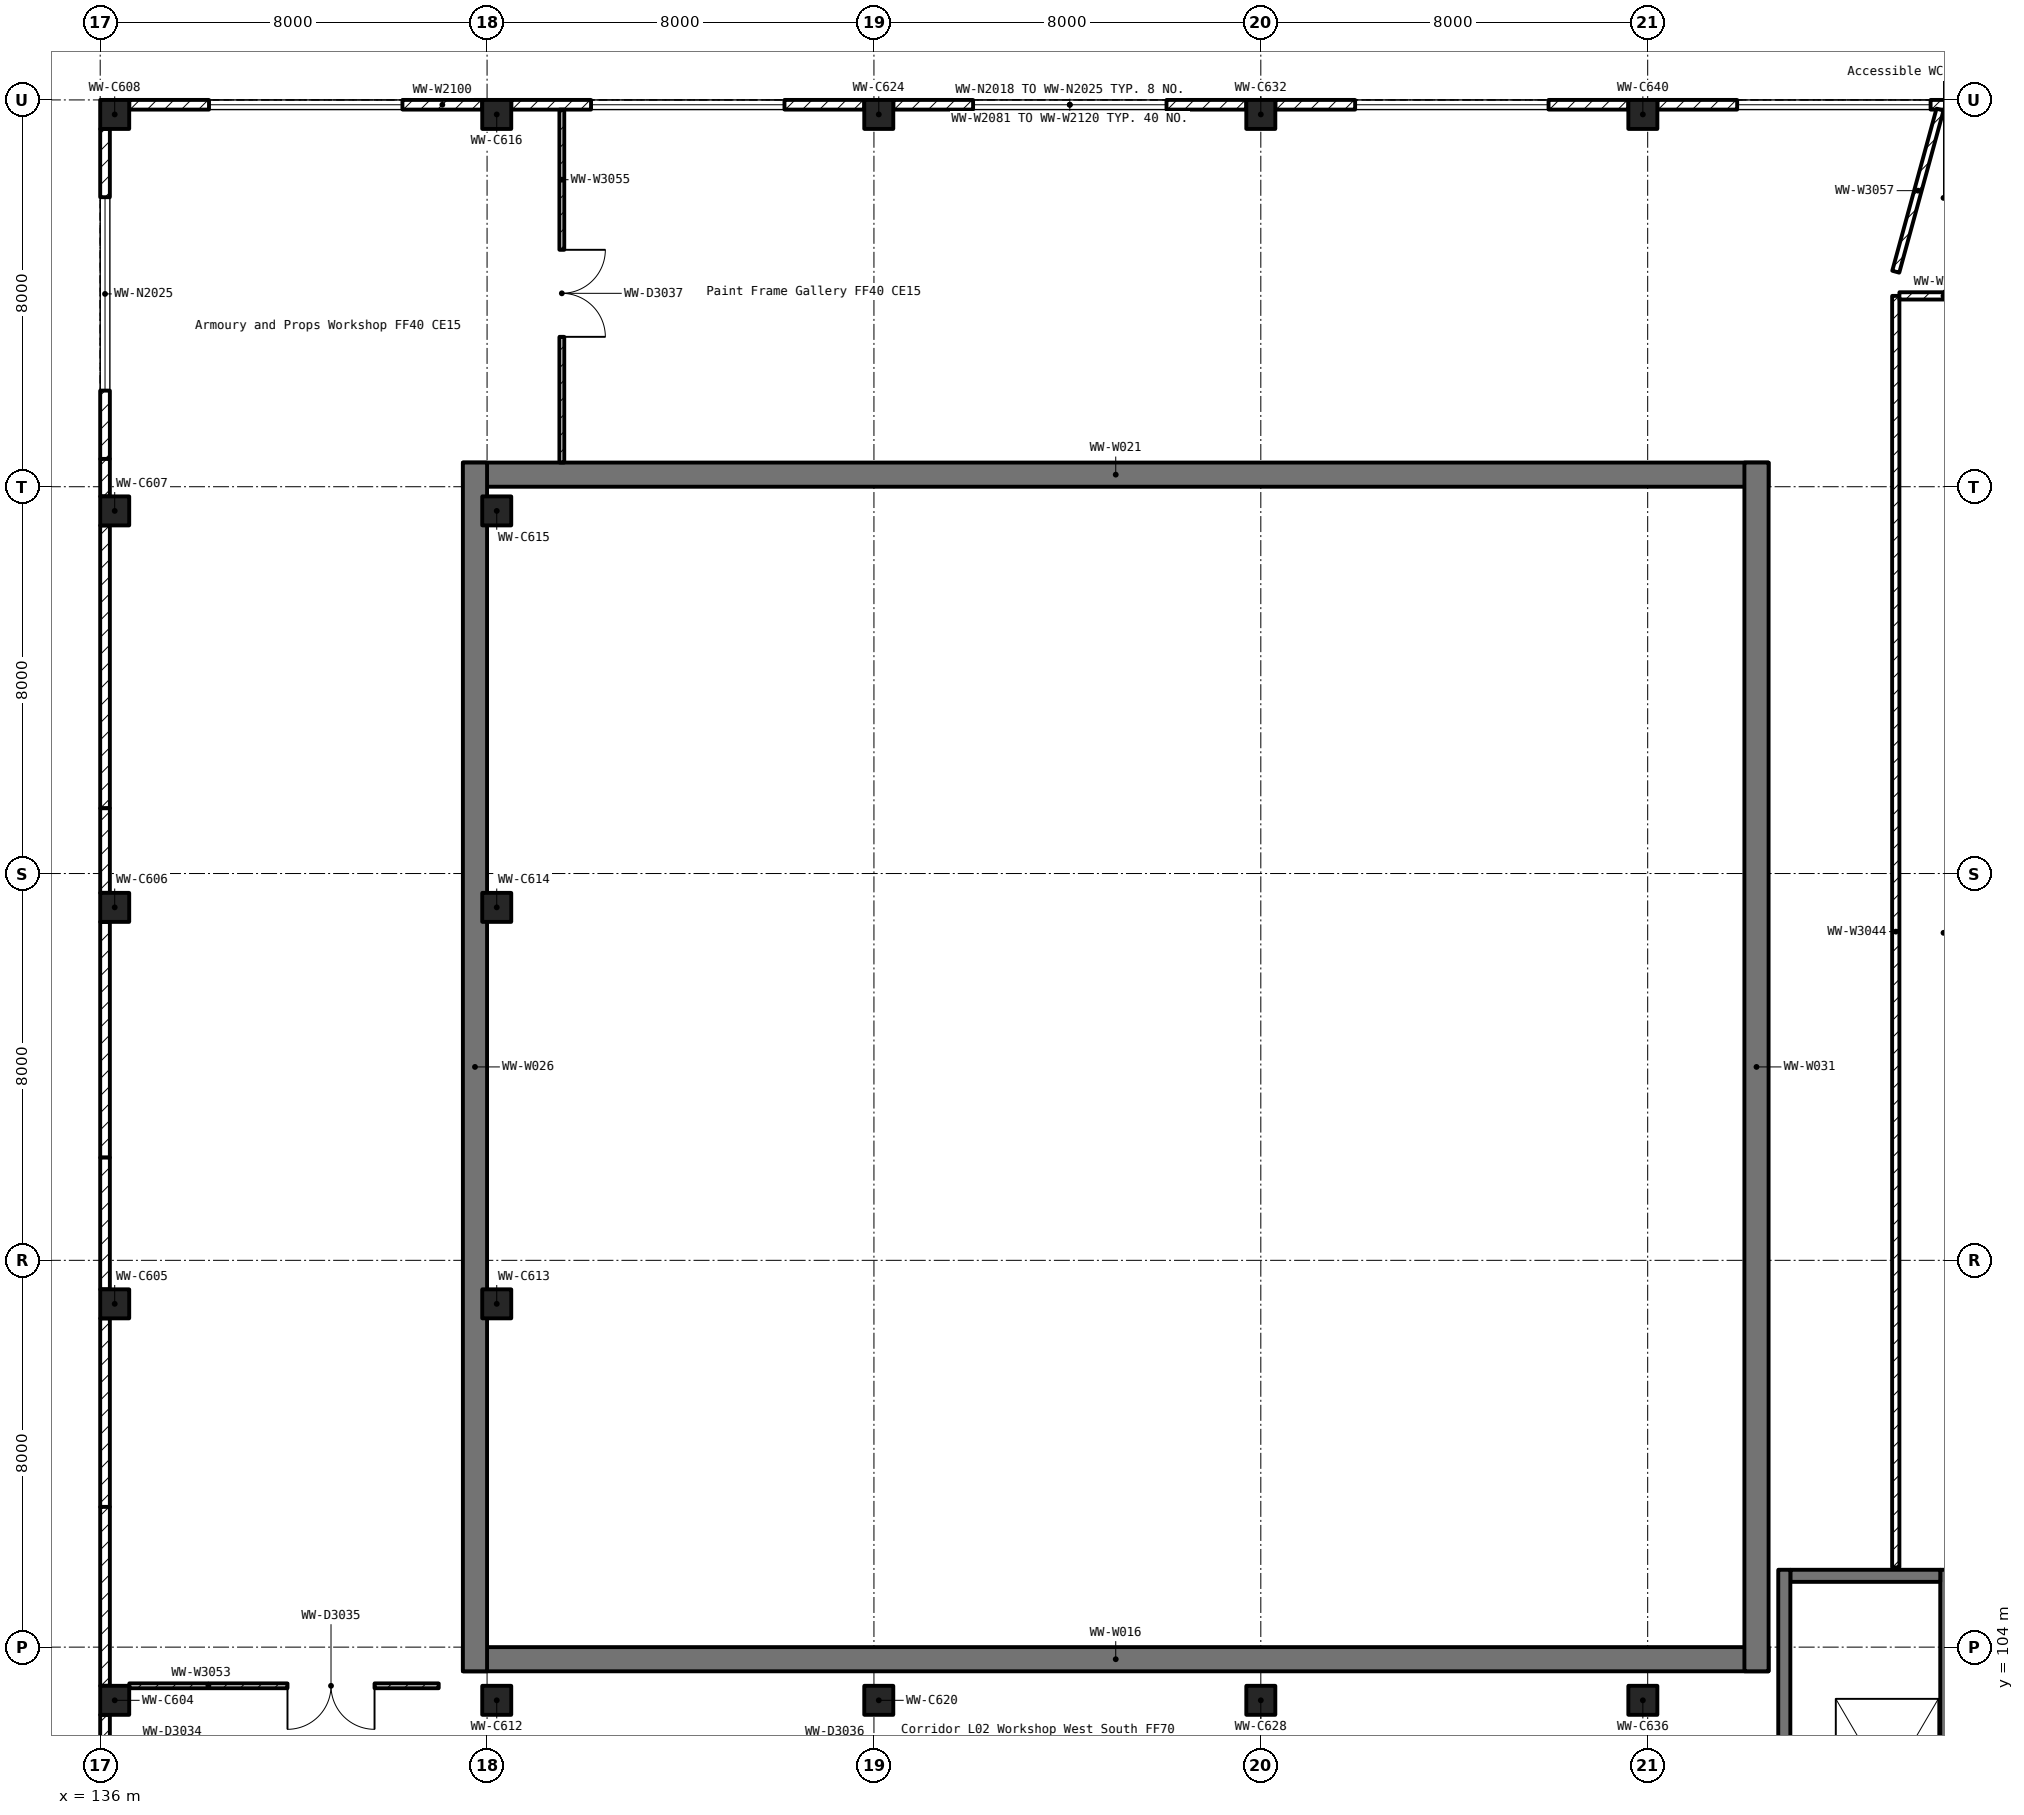
"""IFC4 building model, lengths in metres.
Left out: names, types, materials, properties, quantities, classifications, styles, units other than length and angle.
Written with IfcOpenShell. Run it as: python <this file> out.ifc"""

import sys

from ifc_helpers import new_model, si_unit, direction, frame, frame_2d, origin, origin_2d, place, context, subcontext, project, spatial, rectangle, extrude, element, fill, save


model = new_model("IFC4")
c1 = context("Model", 3, precision=1e-05, world=origin(), true_north=direction((0.0, 1.0)))
c2 = subcontext(c1, "Body", "Model", "MODEL_VIEW")
j1 = project(units=[si_unit("LENGTHUNIT", "METRE"), si_unit("PLANEANGLEUNIT", "RADIAN")], contexts=[c1])
p1 = place(None, origin())
s1 = spatial("IfcSite", under=j1, at=p1, CompositionType="ELEMENT")
p2 = place(p1, origin())
s2 = spatial("IfcBuilding", under=s1, at=p2, CompositionType="ELEMENT")
p3 = place(p2, frame((0.0, 0.0, 11.5)))
s3 = spatial("IfcBuildingStorey", under=s2, at=p3, CompositionType="ELEMENT", Elevation=11.5)
for number, where, z_axis, x_axis in (
    (1, (136.3, 102.9, 0.0), (0.0, 0.0, 1.0), (1.0, 0.0, 0.0)),
    (2, (136.3, 111.1, 0.0), (0.0, 0.0, 1.0), (1.0, 0.0, 0.0)),
    (3, (136.3, 119.3, 0.0), (0.0, 0.0, 1.0), (1.0, 0.0, 0.0)),
    (4, (136.3, 127.5, 0.0), (0.0, 0.0, 1.0), (1.0, 0.0, 0.0)),
    (5, (136.3, 135.7, 0.0), (0.0, 0.0, 1.0), (1.0, 0.0, 0.0)),
    (6, (144.2, 102.9, 0.0), (0.0, 0.0, 1.0), (1.0, 0.0, 0.0)),
    (7, (144.2, 111.1, 0.0), (0.0, 0.0, 1.0), (1.0, 0.0, 0.0)),
    (8, (144.2, 119.3, 0.0), (0.0, 0.0, 1.0), (1.0, 0.0, 0.0)),
    (9, (144.2, 127.5, 0.0), (0.0, 0.0, 1.0), (1.0, 0.0, 0.0)),
    (10, (144.2, 135.7, 0.0), (0.0, 0.0, 1.0), (1.0, 0.0, 0.0)),
    (11, (152.1, 102.9, 0.0), (0.0, 0.0, 1.0), (1.0, 0.0, 0.0)),
    (12, (152.1, 135.7, 0.0), (0.0, 0.0, 1.0), (1.0, 0.0, 0.0)),
    (13, (160.0, 102.9, 0.0), (0.0, 0.0, 1.0), (1.0, 0.0, 0.0)),
    (14, (160.0, 135.7, 0.0), (0.0, 0.0, 1.0), (1.0, 0.0, 0.0)),
    (15, (167.9, 102.9, 0.0), (0.0, 0.0, 1.0), (1.0, 0.0, 0.0)),
    (16, (167.9, 135.7, 0.0), (0.0, 0.0, 1.0), (1.0, 0.0, 0.0)),
):
    element("IfcColumn", number, at=place(p3, frame(where, z_axis=z_axis, x_axis=x_axis)), inside=s3, PredefinedType="COLUMN", context=c2, shape_type="SweptSolid", body=[
        extrude(rectangle(XDim=0.6, YDim=0.6, at=origin_2d()), origin(), (0.0, 0.0, 1.0), 5.5),
    ])
for number, where, z_axis, x_axis in (
    (17, (143.5, 103.75, 0.0), (0.0, 0.0, 1.0), (1.0, 0.0, 0.0)),
    (18, (143.5, 128.25, 0.0), (0.0, 0.0, 1.0), (1.0, 0.0, 0.0)),
):
    element("IfcWall", number, at=place(p3, frame(where, z_axis=z_axis, x_axis=x_axis)), inside=s3, PredefinedType="SHEAR", context=c2, shape_type="SweptSolid", body=[
        extrude(rectangle(XDim=27.0, YDim=0.5, at=frame_2d((13.5, 0.0))), origin(), (0.0, 0.0, 1.0), 5.5),
    ])
for number, where, z_axis, x_axis in (
    (19, (143.75, 103.5, 0.0), (0.0, 0.0, 1.0), (0.0, 1.0, 0.0)),
    (20, (170.25, 103.5, 0.0), (0.0, 0.0, 1.0), (0.0, 1.0, 0.0)),
):
    element("IfcWall", number, at=place(p3, frame(where, z_axis=z_axis, x_axis=x_axis)), inside=s3, PredefinedType="SHEAR", context=c2, shape_type="SweptSolid", body=[
        extrude(rectangle(XDim=25.0, YDim=0.5, at=frame_2d((12.5, 0.0))), origin(), (0.0, 0.0, 1.0), 5.5),
    ])
p4 = place(p3, frame((175.5, 135.9, 0.0), z_axis=(0.0, 0.0, 1.0), x_axis=(-1.0, 0.0, 0.0)))
e21 = element("IfcWall", 21, at=p4, inside=s3, PredefinedType="SOLIDWALL", context=c2, shape_type="SweptSolid", body=[
    extrude(rectangle(XDim=7.3, YDim=0.2, at=frame_2d((3.65, 0.0))), origin(), (0.0, 0.0, 1.0), 4.45),
])
p5 = place(p4, frame((1.65, 0.0, 1.0)))
e22 = element("IfcOpeningElement", 22, at=p5, cuts=e21, PredefinedType="OPENING", context=c2, shape_type="SweptSolid", body=[
    extrude(rectangle(XDim=4.0, YDim=1.8, at=frame_2d((2.0, 0.9))), frame((0.0, 0.112, 0.0), z_axis=(0.0, -1.0, 0.0), x_axis=(1.0, 0.0, 0.0)), (0.0, 0.0, 1.0), 0.224),
])
p6 = place(p3, frame((167.6, 135.9, 0.0), z_axis=(0.0, 0.0, 1.0), x_axis=(-1.0, 0.0, 0.0)))
e23 = element("IfcWall", 23, at=p6, inside=s3, PredefinedType="SOLIDWALL", context=c2, shape_type="SweptSolid", body=[
    extrude(rectangle(XDim=7.3, YDim=0.2, at=frame_2d((3.65, 0.0))), origin(), (0.0, 0.0, 1.0), 4.45),
])
p7 = place(p6, frame((1.65, 0.0, 1.0)))
e24 = element("IfcOpeningElement", 24, at=p7, cuts=e23, PredefinedType="OPENING", context=c2, shape_type="SweptSolid", body=[
    extrude(rectangle(XDim=4.0, YDim=1.8, at=frame_2d((2.0, 0.9))), frame((0.0, 0.112, 0.0), z_axis=(0.0, -1.0, 0.0), x_axis=(1.0, 0.0, 0.0)), (0.0, 0.0, 1.0), 0.224),
])
p8 = place(p3, frame((159.7, 135.9, 0.0), z_axis=(0.0, 0.0, 1.0), x_axis=(-1.0, 0.0, 0.0)))
e25 = element("IfcWall", 25, at=p8, inside=s3, PredefinedType="SOLIDWALL", context=c2, shape_type="SweptSolid", body=[
    extrude(rectangle(XDim=7.3, YDim=0.2, at=frame_2d((3.65, 0.0))), origin(), (0.0, 0.0, 1.0), 4.45),
])
p9 = place(p8, frame((1.65, 0.0, 1.0)))
e26 = element("IfcOpeningElement", 26, at=p9, cuts=e25, PredefinedType="OPENING", context=c2, shape_type="SweptSolid", body=[
    extrude(rectangle(XDim=4.0, YDim=1.8, at=frame_2d((2.0, 0.9))), frame((0.0, 0.112, 0.0), z_axis=(0.0, -1.0, 0.0), x_axis=(1.0, 0.0, 0.0)), (0.0, 0.0, 1.0), 0.224),
])
p10 = place(p3, frame((151.8, 135.9, 0.0), z_axis=(0.0, 0.0, 1.0), x_axis=(-1.0, 0.0, 0.0)))
e27 = element("IfcWall", 27, at=p10, inside=s3, PredefinedType="SOLIDWALL", context=c2, shape_type="SweptSolid", body=[
    extrude(rectangle(XDim=7.3, YDim=0.2, at=frame_2d((3.65, 0.0))), origin(), (0.0, 0.0, 1.0), 4.45),
])
p11 = place(p10, frame((1.65, 0.0, 1.0)))
e28 = element("IfcOpeningElement", 28, at=p11, cuts=e27, PredefinedType="OPENING", context=c2, shape_type="SweptSolid", body=[
    extrude(rectangle(XDim=4.0, YDim=1.8, at=frame_2d((2.0, 0.9))), frame((0.0, 0.112, 0.0), z_axis=(0.0, -1.0, 0.0), x_axis=(1.0, 0.0, 0.0)), (0.0, 0.0, 1.0), 0.224),
])
p12 = place(p3, frame((143.9, 135.9, 0.0), z_axis=(0.0, 0.0, 1.0), x_axis=(-1.0, 0.0, 0.0)))
e29 = element("IfcWall", 29, at=p12, inside=s3, PredefinedType="SOLIDWALL", context=c2, shape_type="SweptSolid", body=[
    extrude(rectangle(XDim=7.3, YDim=0.2, at=frame_2d((3.65, 0.0))), origin(), (0.0, 0.0, 1.0), 4.45),
])
p13 = place(p12, frame((1.65, 0.0, 1.0)))
e30 = element("IfcOpeningElement", 30, at=p13, cuts=e29, PredefinedType="OPENING", context=c2, shape_type="SweptSolid", body=[
    extrude(rectangle(XDim=4.0, YDim=1.8, at=frame_2d((2.0, 0.9))), frame((0.0, 0.112, 0.0), z_axis=(0.0, -1.0, 0.0), x_axis=(1.0, 0.0, 0.0)), (0.0, 0.0, 1.0), 0.224),
])
p14 = place(p3, frame((136.1, 135.4, 0.0), z_axis=(0.0, 0.0, 1.0), x_axis=(0.0, -1.0, 0.0)))
e31 = element("IfcWall", 31, at=p14, inside=s3, PredefinedType="SOLIDWALL", context=c2, shape_type="SweptSolid", body=[
    extrude(rectangle(XDim=6.825, YDim=0.2, at=frame_2d((3.413, 0.0))), origin(), (0.0, 0.0, 1.0), 4.45),
])
p15 = place(p14, frame((1.412, 0.0, 1.0)))
e32 = element("IfcOpeningElement", 32, at=p15, cuts=e31, PredefinedType="OPENING", context=c2, shape_type="SweptSolid", body=[
    extrude(rectangle(XDim=4.0, YDim=1.8, at=frame_2d((2.0, 0.9))), frame((0.0, 0.112, 0.0), z_axis=(0.0, -1.0, 0.0), x_axis=(1.0, 0.0, 0.0)), (0.0, 0.0, 1.0), 0.224),
])
p16 = place(p3, frame((136.1, 128.575, 0.0), z_axis=(0.0, 0.0, 1.0), x_axis=(0.0, -1.0, 0.0)))
e33 = element("IfcWall", 33, at=p16, inside=s3, PredefinedType="SOLIDWALL", context=c2, shape_type="SweptSolid", body=[
    extrude(rectangle(XDim=0.775, YDim=0.2, at=frame_2d((0.387, 0.0))), origin(), (0.0, 0.0, 1.0), 4.45),
])
p17 = place(p3, frame((136.1, 127.2, 0.0), z_axis=(0.0, 0.0, 1.0), x_axis=(0.0, -1.0, 0.0)))
e34 = element("IfcWall", 34, at=p17, inside=s3, PredefinedType="SOLIDWALL", context=c2, shape_type="SweptSolid", body=[
    extrude(rectangle(XDim=5.85, YDim=0.2, at=frame_2d((2.925, 0.0))), origin(), (0.0, 0.0, 1.0), 4.45),
])
p18 = place(p3, frame((136.1, 121.35, 0.0), z_axis=(0.0, 0.0, 1.0), x_axis=(0.0, -1.0, 0.0)))
e35 = element("IfcWall", 35, at=p18, inside=s3, PredefinedType="SOLIDWALL", context=c2, shape_type="SweptSolid", body=[
    extrude(rectangle(XDim=1.75, YDim=0.2, at=frame_2d((0.875, 0.0))), origin(), (0.0, 0.0, 1.0), 4.45),
])
p19 = place(p3, frame((136.1, 119.0, 0.0), z_axis=(0.0, 0.0, 1.0), x_axis=(0.0, -1.0, 0.0)))
e36 = element("IfcWall", 36, at=p19, inside=s3, PredefinedType="SOLIDWALL", context=c2, shape_type="SweptSolid", body=[
    extrude(rectangle(XDim=4.875, YDim=0.2, at=frame_2d((2.438, 0.0))), origin(), (0.0, 0.0, 1.0), 4.45),
])
p20 = place(p3, frame((136.1, 114.125, 0.0), z_axis=(0.0, 0.0, 1.0), x_axis=(0.0, -1.0, 0.0)))
e37 = element("IfcWall", 37, at=p20, inside=s3, PredefinedType="SOLIDWALL", context=c2, shape_type="SweptSolid", body=[
    extrude(rectangle(XDim=2.725, YDim=0.2, at=frame_2d((1.363, 0.0))), origin(), (0.0, 0.0, 1.0), 4.45),
])
p21 = place(p3, frame((136.1, 110.8, 0.0), z_axis=(0.0, 0.0, 1.0), x_axis=(0.0, -1.0, 0.0)))
e38 = element("IfcWall", 38, at=p21, inside=s3, PredefinedType="SOLIDWALL", context=c2, shape_type="SweptSolid", body=[
    extrude(rectangle(XDim=3.9, YDim=0.2, at=frame_2d((1.95, 0.0))), origin(), (0.0, 0.0, 1.0), 4.45),
])
p22 = place(p3, frame((136.1, 106.9, 0.0), z_axis=(0.0, 0.0, 1.0), x_axis=(0.0, -1.0, 0.0)))
e39 = element("IfcWall", 39, at=p22, inside=s3, PredefinedType="SOLIDWALL", context=c2, shape_type="SweptSolid", body=[
    extrude(rectangle(XDim=3.7, YDim=0.2, at=frame_2d((1.85, 0.0))), origin(), (0.0, 0.0, 1.0), 4.45),
])
p23 = place(p3, frame((136.1, 102.6, 0.0), z_axis=(0.0, 0.0, 1.0), x_axis=(0.0, -1.0, 0.0)))
e40 = element("IfcWall", 40, at=p23, inside=s3, PredefinedType="SOLIDWALL", context=c2, shape_type="SweptSolid", body=[
    extrude(rectangle(XDim=2.925, YDim=0.2, at=frame_2d((1.462, 0.0))), origin(), (0.0, 0.0, 1.0), 4.45),
])
p24 = place(p3, frame((174.175, 99.0, 0.0), z_axis=(0.0, 0.0, 1.0), x_axis=(0.0, 1.0, 0.0)))
e41 = element("IfcWall", 41, at=p24, inside=s3, PredefinedType="SOLIDWALL", context=c2, shape_type="SweptSolid", body=[
    extrude(rectangle(XDim=6.6, YDim=0.25, at=frame_2d((3.3, 0.0))), origin(), (0.0, 0.0, 1.0), 5.5),
])
p25 = place(p3, frame((174.05, 105.475, 0.0), z_axis=(0.0, 0.0, 1.0), x_axis=(-1.0, 0.0, 0.0)))
e42 = element("IfcWall", 42, at=p25, inside=s3, PredefinedType="SOLIDWALL", context=c2, shape_type="SweptSolid", body=[
    extrude(rectangle(XDim=3.1, YDim=0.25, at=frame_2d((1.55, 0.0))), origin(), (0.0, 0.0, 1.0), 5.5),
])
p26 = place(p3, frame((170.825, 105.6, 0.0), z_axis=(0.0, 0.0, 1.0), x_axis=(0.0, -1.0, 0.0)))
e43 = element("IfcWall", 43, at=p26, inside=s3, PredefinedType="SOLIDWALL", context=c2, shape_type="SweptSolid", body=[
    extrude(rectangle(XDim=6.6, YDim=0.25, at=frame_2d((3.3, 0.0))), origin(), (0.0, 0.0, 1.0), 5.5),
])
p27 = place(p3, frame((173.13, 131.947, 0.0), z_axis=(0.0, 0.0, 1.0), x_axis=(0.0, -1.0, 0.0)))
e44 = element("IfcWall", 44, at=p27, inside=s3, PredefinedType="PARTITIONING", context=c2, shape_type="SweptSolid", body=[
    extrude(rectangle(XDim=26.297, YDim=0.15, at=frame_2d((13.148, 0.0))), origin(), (0.0, 0.0, 1.0), 4.35),
])
p28 = place(p3, frame((143.0, 103.2, 0.0), z_axis=(0.0, 0.0, 1.0), x_axis=(-1.0, 0.0, 0.0)))
e45 = element("IfcWall", 45, at=p28, inside=s3, PredefinedType="PARTITIONING", context=c2, shape_type="SweptSolid", body=[
    extrude(rectangle(XDim=6.399, YDim=0.1, at=frame_2d((3.199, 0.0))), origin(), (0.0, 0.0, 1.0), 4.35),
])
p29 = place(p28, frame((1.327, 0.0, 0.0)))
e46 = element("IfcOpeningElement", 46, at=p29, cuts=e45, PredefinedType="OPENING", context=c2, shape_type="SweptSolid", body=[
    extrude(rectangle(XDim=1.8, YDim=2.1, at=frame_2d((0.9, 1.05))), frame((0.0, 0.062, 0.0), z_axis=(0.0, -1.0, 0.0), x_axis=(1.0, 0.0, 0.0)), (0.0, 0.0, 1.0), 0.124),
])
p30 = place(p3, frame((145.546, 135.8, 0.0), z_axis=(0.0, 0.0, 1.0), x_axis=(0.0, -1.0, 0.0)))
e47 = element("IfcWall", 47, at=p30, inside=s3, PredefinedType="PARTITIONING", context=c2, shape_type="SweptSolid", body=[
    extrude(rectangle(XDim=7.3, YDim=0.1, at=frame_2d((3.65, 0.0))), origin(), (0.0, 0.0, 1.0), 4.35),
])
p31 = place(p30, frame((2.9, 0.0, 0.0)))
e48 = element("IfcOpeningElement", 48, at=p31, cuts=e47, PredefinedType="OPENING", context=c2, shape_type="SweptSolid", body=[
    extrude(rectangle(XDim=1.8, YDim=2.1, at=frame_2d((0.9, 1.05))), frame((0.0, 0.062, 0.0), z_axis=(0.0, -1.0, 0.0), x_axis=(1.0, 0.0, 0.0)), (0.0, 0.0, 1.0), 0.124),
])
p32 = place(p3, frame((174.045, 135.8, 0.0), z_axis=(0.0, 0.0, 1.0), x_axis=(-0.263271937706, -0.964721662873, 0.0)))
e49 = element("IfcWall", 49, at=p32, inside=s3, PredefinedType="PARTITIONING", context=c2, shape_type="SweptSolid", body=[
    extrude(rectangle(XDim=3.476, YDim=0.15, at=frame_2d((1.738, 0.0))), origin(), (0.0, 0.0, 1.0), 4.35),
])
p33 = place(p3, frame((175.029, 131.947, 0.0), z_axis=(0.0, 0.0, 1.0), x_axis=(-1.0, 0.0, 0.0)))
e50 = element("IfcWall", 50, at=p33, inside=s3, PredefinedType="PARTITIONING", context=c2, shape_type="SweptSolid", body=[
    extrude(rectangle(XDim=1.824, YDim=0.15, at=frame_2d((0.912, 0.0))), origin(), (0.0, 0.0, 1.0), 4.35),
])
p34 = place(p5, origin())
e51 = element("IfcWindow", 51, at=p34, inside=s3, PartitioningType="DOUBLE_PANEL_VERTICAL", PredefinedType="WINDOW", context=c2, shape_type="SweptSolid", body=[
    extrude(rectangle(XDim=4.0, YDim=1.8, at=frame_2d((2.0, 0.9))), frame((0.0, 0.03, 0.0), z_axis=(0.0, -1.0, 0.0), x_axis=(1.0, 0.0, 0.0)), (0.0, 0.0, 1.0), 0.06),
])
fill(e22, e51)
p35 = place(p7, origin())
e52 = element("IfcWindow", 52, at=p35, inside=s3, PartitioningType="DOUBLE_PANEL_VERTICAL", PredefinedType="WINDOW", context=c2, shape_type="SweptSolid", body=[
    extrude(rectangle(XDim=4.0, YDim=1.8, at=frame_2d((2.0, 0.9))), frame((0.0, 0.03, 0.0), z_axis=(0.0, -1.0, 0.0), x_axis=(1.0, 0.0, 0.0)), (0.0, 0.0, 1.0), 0.06),
])
fill(e24, e52)
p36 = place(p9, origin())
e53 = element("IfcWindow", 53, at=p36, inside=s3, PartitioningType="DOUBLE_PANEL_VERTICAL", PredefinedType="WINDOW", context=c2, shape_type="SweptSolid", body=[
    extrude(rectangle(XDim=4.0, YDim=1.8, at=frame_2d((2.0, 0.9))), frame((0.0, 0.03, 0.0), z_axis=(0.0, -1.0, 0.0), x_axis=(1.0, 0.0, 0.0)), (0.0, 0.0, 1.0), 0.06),
])
fill(e26, e53)
p37 = place(p11, origin())
e54 = element("IfcWindow", 54, at=p37, inside=s3, PartitioningType="DOUBLE_PANEL_VERTICAL", PredefinedType="WINDOW", context=c2, shape_type="SweptSolid", body=[
    extrude(rectangle(XDim=4.0, YDim=1.8, at=frame_2d((2.0, 0.9))), frame((0.0, 0.03, 0.0), z_axis=(0.0, -1.0, 0.0), x_axis=(1.0, 0.0, 0.0)), (0.0, 0.0, 1.0), 0.06),
])
fill(e28, e54)
p38 = place(p13, origin())
e55 = element("IfcWindow", 55, at=p38, inside=s3, PartitioningType="DOUBLE_PANEL_VERTICAL", PredefinedType="WINDOW", context=c2, shape_type="SweptSolid", body=[
    extrude(rectangle(XDim=4.0, YDim=1.8, at=frame_2d((2.0, 0.9))), frame((0.0, 0.03, 0.0), z_axis=(0.0, -1.0, 0.0), x_axis=(1.0, 0.0, 0.0)), (0.0, 0.0, 1.0), 0.06),
])
fill(e30, e55)
p39 = place(p15, origin())
e56 = element("IfcWindow", 56, at=p39, inside=s3, PartitioningType="DOUBLE_PANEL_VERTICAL", PredefinedType="WINDOW", context=c2, shape_type="SweptSolid", body=[
    extrude(rectangle(XDim=4.0, YDim=1.8, at=frame_2d((2.0, 0.9))), frame((0.0, 0.03, 0.0), z_axis=(0.0, -1.0, 0.0), x_axis=(1.0, 0.0, 0.0)), (0.0, 0.0, 1.0), 0.06),
])
fill(e32, e56)
p40 = place(p29, origin())
e57 = element("IfcDoor", 57, at=p40, inside=s3, OperationType="DOUBLE_DOOR_SINGLE_SWING", PredefinedType="DOOR", context=c2, shape_type="SweptSolid", body=[
    extrude(rectangle(XDim=1.8, YDim=2.1, at=frame_2d((0.9, 1.05))), frame((0.0, 0.025, 0.0), z_axis=(0.0, -1.0, 0.0), x_axis=(1.0, 0.0, 0.0)), (0.0, 0.0, 1.0), 0.05),
])
fill(e46, e57)
p41 = place(p31, origin())
e58 = element("IfcDoor", 58, at=p41, inside=s3, OperationType="DOUBLE_DOOR_SINGLE_SWING", PredefinedType="DOOR", context=c2, shape_type="SweptSolid", body=[
    extrude(rectangle(XDim=1.8, YDim=2.1, at=frame_2d((0.9, 1.05))), frame((0.0, 0.025, 0.0), z_axis=(0.0, -1.0, 0.0), x_axis=(1.0, 0.0, 0.0)), (0.0, 0.0, 1.0), 0.05),
])
fill(e48, e58)
save(model, sys.argv[1])
